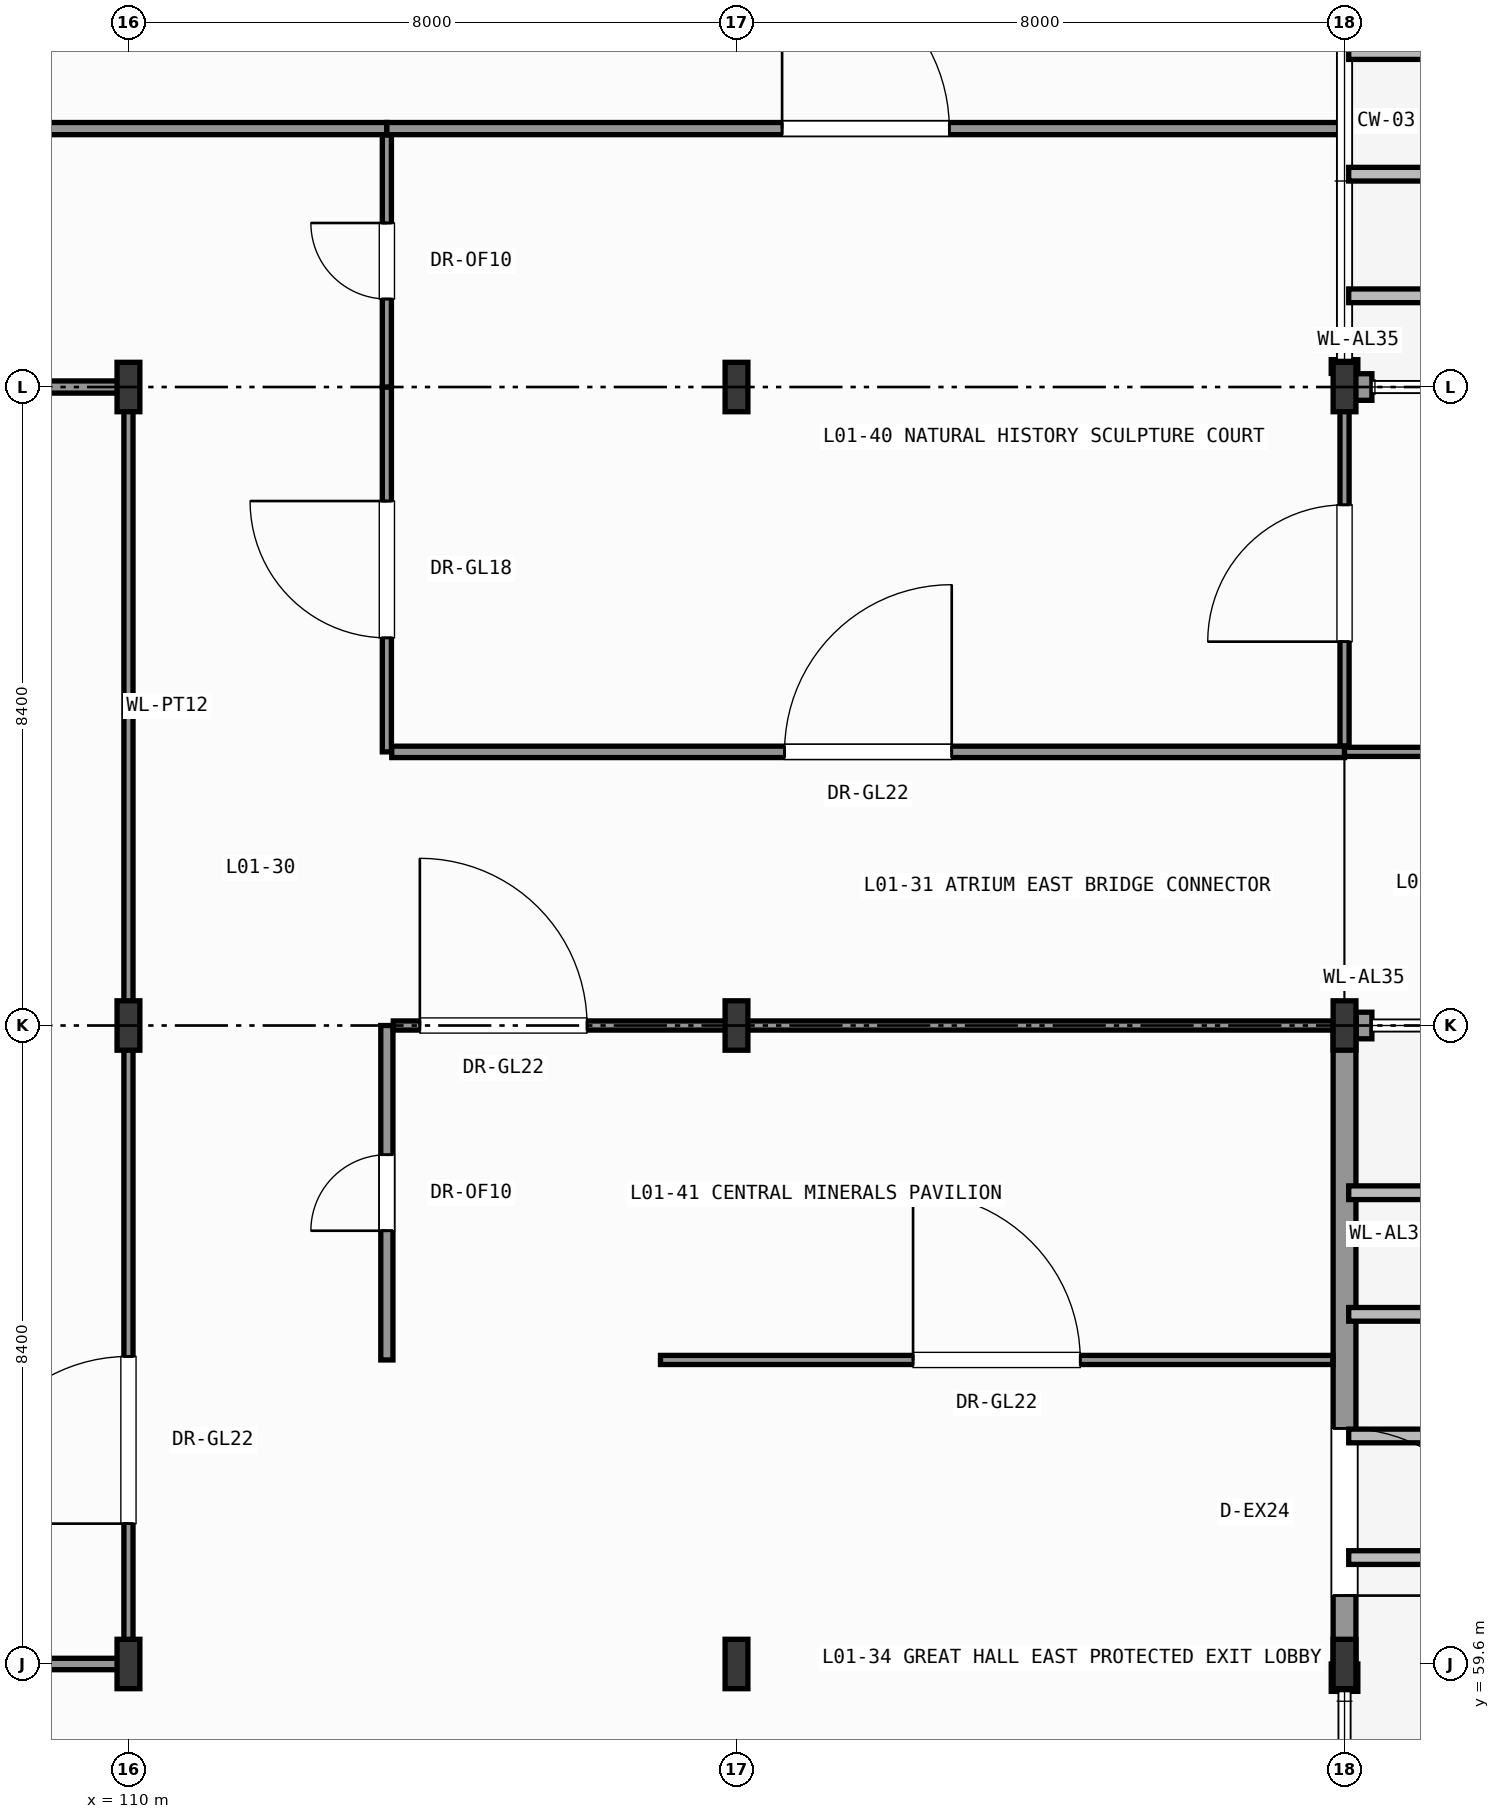
"""IFC4 building model, lengths in metres.
Left out: names, types, materials, properties, quantities, classifications, styles, units other than length and angle.
Written with IfcOpenShell. Run it as: python <this file> out.ifc"""

import sys

from ifc_helpers import new_model, si_unit, direction, frame, frame_2d, origin, origin_2d, place, context, subcontext, project, spatial, rectangle, i_section, extrude, element, fill, save


model = new_model("IFC4")
c1 = context("Model", 3, precision=1e-05, world=origin(), true_north=direction((0.0, 1.0)))
c2 = subcontext(c1, "Body", "Model", "MODEL_VIEW")
j1 = project(units=[si_unit("LENGTHUNIT", "METRE"), si_unit("PLANEANGLEUNIT", "RADIAN")], contexts=[c1])
p1 = place(None, origin())
s1 = spatial("IfcSite", under=j1, at=p1, CompositionType="ELEMENT")
p2 = place(p1, origin())
s2 = spatial("IfcBuilding", under=s1, at=p2, CompositionType="ELEMENT")
p3 = place(p2, origin())
s3 = spatial("IfcBuildingStorey", under=s2, at=p3, CompositionType="ELEMENT", Elevation=0.0)
for number, where, z_axis, x_axis in (
    (1, (110.0, 59.6, 0.0), (0.0, 0.0, 1.0), (1.0, 0.0, 0.0)),
    (2, (110.0, 68.0, 0.0), (0.0, 0.0, 1.0), (1.0, 0.0, 0.0)),
    (3, (110.0, 76.4, 0.0), (0.0, 0.0, 1.0), (1.0, 0.0, 0.0)),
    (4, (118.0, 59.6, 0.0), (0.0, 0.0, 1.0), (1.0, 0.0, 0.0)),
    (5, (118.0, 68.0, 0.0), (0.0, 0.0, 1.0), (1.0, 0.0, 0.0)),
    (6, (118.0, 76.4, 0.0), (0.0, 0.0, 1.0), (1.0, 0.0, 0.0)),
    (7, (126.0, 59.6, 0.0), (0.0, 0.0, 1.0), (1.0, 0.0, 0.0)),
    (8, (126.0, 68.0, 0.0), (0.0, 0.0, 1.0), (1.0, 0.0, 0.0)),
    (9, (126.0, 76.4, 0.0), (0.0, 0.0, 1.0), (1.0, 0.0, 0.0)),
):
    element("IfcColumn", number, at=place(p3, frame(where, z_axis=z_axis, x_axis=x_axis)), inside=s3, PredefinedType="COLUMN", context=c2, shape_type="SweptSolid", body=[
        extrude(i_section(OverallWidth=0.3, OverallDepth=0.65, WebThickness=0.016, FlangeThickness=0.031, FilletRadius=0.027, at=origin_2d()), origin(), (0.0, 0.0, 1.0), 7.8),
    ])
p4 = place(p3, frame((126.0, 59.24, 0.0), z_axis=(0.0, 0.0, 1.0), x_axis=(0.0, 1.0, 0.0)))
e10 = element("IfcWall", 10, at=p4, inside=s3, PredefinedType="SOLIDWALL", context=c2, shape_type="SweptSolid", body=[
    extrude(rectangle(XDim=0.36, YDim=0.35, at=frame_2d((0.18, 0.0))), origin(), (0.0, 0.0, 1.0), 7.235),
])
p5 = place(p3, frame((126.0, 68.0, 0.0), z_axis=(0.0, 0.0, 1.0), x_axis=(0.0, -1.0, 0.0)))
e11 = element("IfcWall", 11, at=p5, inside=s3, PredefinedType="SOLIDWALL", context=c2, shape_type="SweptSolid", body=[
    extrude(rectangle(XDim=8.4, YDim=0.3, at=frame_2d((4.2, 0.0))), origin(), (0.0, 0.0, 1.0), 7.085),
])
p6 = place(p5, frame((5.3, 0.0, 0.0)))
e12 = element("IfcOpeningElement", 12, at=p6, cuts=e11, PredefinedType="OPENING", context=c2, shape_type="SweptSolid", body=[
    extrude(rectangle(XDim=2.2, YDim=2.7, at=frame_2d((1.1, 1.35))), frame((0.0, 0.16, 0.0), z_axis=(0.0, -1.0, 0.0), x_axis=(1.0, 0.0, 0.0)), (0.0, 0.0, 1.0), 0.32),
])
p7 = place(p3, frame((126.154, 68.0, 0.0), z_axis=(0.0, 0.0, 1.0), x_axis=(1.0, 0.0, 0.0)))
e13 = element("IfcWall", 13, at=p7, inside=s3, PredefinedType="SOLIDWALL", context=c2, shape_type="SweptSolid", body=[
    extrude(rectangle(XDim=0.206, YDim=0.35, at=frame_2d((0.103, 0.0))), origin(), (0.0, 0.0, 1.0), 7.54),
])
p8 = place(p3, frame((126.36, 76.4, 0.0), z_axis=(0.0, 0.0, 1.0), x_axis=(-1.0, 0.0, 0.0)))
e14 = element("IfcWall", 14, at=p8, inside=s3, PredefinedType="SOLIDWALL", context=c2, shape_type="SweptSolid", body=[
    extrude(rectangle(XDim=0.36, YDim=0.35, at=frame_2d((0.18, 0.0))), origin(), (0.0, 0.0, 1.0), 7.135),
])
p9 = place(p3, frame((126.0, 76.579, 0.0), z_axis=(0.0, 0.0, 1.0), x_axis=(0.0, 1.0, 0.0)))
e15 = element("IfcWall", 15, at=p9, inside=s3, PredefinedType="SOLIDWALL", context=c2, shape_type="SweptSolid", body=[
    extrude(rectangle(XDim=0.181, YDim=0.35, at=frame_2d((0.09, 0.0))), origin(), (0.0, 0.0, 1.0), 7.54),
])
p10 = place(p3, frame((86.084, 59.6, 0.0), z_axis=(0.0, 0.0, 1.0), x_axis=(1.0, 0.0, 0.0)))
e16 = element("IfcWall", 16, at=p10, inside=s3, PredefinedType="PARTITIONING", context=c2, shape_type="SweptSolid", body=[
    extrude(rectangle(XDim=23.916, YDim=0.15, at=frame_2d((11.958, 0.0))), origin(), (0.0, 0.0, 1.0), 7.135),
])
p11 = place(p10, frame((10.858, 0.0, 0.0)))
e17 = element("IfcOpeningElement", 17, at=p11, cuts=e16, PredefinedType="OPENING", context=c2, shape_type="SweptSolid", body=[
    extrude(rectangle(XDim=2.2, YDim=2.6, at=frame_2d((1.1, 1.3))), frame((0.0, 0.085, 0.0), z_axis=(0.0, -1.0, 0.0), x_axis=(1.0, 0.0, 0.0)), (0.0, 0.0, 1.0), 0.17),
])
p12 = place(p3, frame((110.0, 59.679, 0.0), z_axis=(0.0, 0.0, 1.0), x_axis=(0.0, 1.0, 0.0)))
e18 = element("IfcWall", 18, at=p12, inside=s3, PredefinedType="PARTITIONING", context=c2, shape_type="SweptSolid", body=[
    extrude(rectangle(XDim=16.721, YDim=0.12, at=frame_2d((8.36, 0.0))), origin(), (0.0, 0.0, 1.0), 7.085),
])
p13 = place(p12, frame((1.768, 0.0, 0.0)))
e19 = element("IfcOpeningElement", 19, at=p13, cuts=e18, PredefinedType="OPENING", context=c2, shape_type="SweptSolid", body=[
    extrude(rectangle(XDim=2.2, YDim=2.6, at=frame_2d((1.1, 1.3))), frame((0.0, 0.07, 0.0), z_axis=(0.0, -1.0, 0.0), x_axis=(1.0, 0.0, 0.0)), (0.0, 0.0, 1.0), 0.14),
])
p14 = place(p3, frame((86.0, 76.4, 0.0), z_axis=(0.0, 0.0, 1.0), x_axis=(1.0, 0.0, 0.0)))
e20 = element("IfcWall", 20, at=p14, inside=s3, PredefinedType="PARTITIONING", context=c2, shape_type="SweptSolid", body=[
    extrude(rectangle(XDim=23.936, YDim=0.16, at=frame_2d((11.968, 0.0))), origin(), (0.0, 0.0, 1.0), 7.135),
])
p15 = place(p14, frame((10.868, 0.0, 0.0)))
e21 = element("IfcOpeningElement", 21, at=p15, cuts=e20, PredefinedType="OPENING", context=c2, shape_type="SweptSolid", body=[
    extrude(rectangle(XDim=2.2, YDim=2.6, at=frame_2d((1.1, 1.3))), frame((0.0, 0.09, 0.0), z_axis=(0.0, -1.0, 0.0), x_axis=(1.0, 0.0, 0.0)), (0.0, 0.0, 1.0), 0.18),
])
p16 = place(p3, frame((113.4, 71.6, 0.0), z_axis=(0.0, 0.0, 1.0), x_axis=(0.0, 1.0, 0.0)))
e22 = element("IfcWall", 22, at=p16, inside=s3, PredefinedType="PARTITIONING", context=c2, shape_type="SweptSolid", body=[
    extrude(rectangle(XDim=4.8, YDim=0.12, at=frame_2d((2.4, 0.0))), origin(), (0.0, 0.0, 1.0), 7.54),
])
p17 = place(p16, frame((1.5, 0.0, 0.0)))
e23 = element("IfcOpeningElement", 23, at=p17, cuts=e22, PredefinedType="OPENING", context=c2, shape_type="SweptSolid", body=[
    extrude(rectangle(XDim=1.8, YDim=2.4, at=frame_2d((0.9, 1.2))), frame((0.0, 0.07, 0.0), z_axis=(0.0, -1.0, 0.0), x_axis=(1.0, 0.0, 0.0)), (0.0, 0.0, 1.0), 0.14),
])
p18 = place(p3, frame((113.4, 63.6, 0.0), z_axis=(0.0, 0.0, 1.0), x_axis=(0.0, 1.0, 0.0)))
e24 = element("IfcWall", 24, at=p18, inside=s3, PredefinedType="PARTITIONING", context=c2, shape_type="SweptSolid", body=[
    extrude(rectangle(XDim=4.4, YDim=0.16, at=frame_2d((2.2, 0.0))), origin(), (0.0, 0.0, 1.0), 7.54),
])
p19 = place(p18, frame((1.7, 0.0, 0.0)))
e25 = element("IfcOpeningElement", 25, at=p19, cuts=e24, PredefinedType="OPENING", context=c2, shape_type="SweptSolid", body=[
    extrude(rectangle(XDim=1.0, YDim=2.15, at=frame_2d((0.5, 1.075))), frame((0.0, 0.09, 0.0), z_axis=(0.0, -1.0, 0.0), x_axis=(1.0, 0.0, 0.0)), (0.0, 0.0, 1.0), 0.18),
])
p20 = place(p3, frame((113.464, 71.6, 0.0), z_axis=(0.0, 0.0, 1.0), x_axis=(1.0, 0.0, 0.0)))
e26 = element("IfcWall", 26, at=p20, inside=s3, PredefinedType="PARTITIONING", context=c2, shape_type="SweptSolid", body=[
    extrude(rectangle(XDim=12.536, YDim=0.15, at=frame_2d((6.268, 0.0))), origin(), (0.0, 0.0, 1.0), 7.54),
])
p21 = place(p20, frame((5.168, 0.0, 0.0)))
e27 = element("IfcOpeningElement", 27, at=p21, cuts=e26, PredefinedType="OPENING", context=c2, shape_type="SweptSolid", body=[
    extrude(rectangle(XDim=2.2, YDim=2.6, at=frame_2d((1.1, 1.3))), frame((0.0, 0.085, 0.0), z_axis=(0.0, -1.0, 0.0), x_axis=(1.0, 0.0, 0.0)), (0.0, 0.0, 1.0), 0.17),
])
p22 = place(p3, frame((113.484, 68.0, 0.0), z_axis=(0.0, 0.0, 1.0), x_axis=(1.0, 0.0, 0.0)))
e28 = element("IfcWall", 28, at=p22, inside=s3, PredefinedType="PARTITIONING", context=c2, shape_type="SweptSolid", body=[
    extrude(rectangle(XDim=12.362, YDim=0.12, at=frame_2d((6.181, 0.0))), origin(), (0.0, 0.0, 1.0), 7.225),
])
p23 = place(p22, frame((0.35, 0.0, 0.0)))
e29 = element("IfcOpeningElement", 29, at=p23, cuts=e28, PredefinedType="OPENING", context=c2, shape_type="SweptSolid", body=[
    extrude(rectangle(XDim=2.2, YDim=2.6, at=frame_2d((1.1, 1.3))), frame((0.0, 0.07, 0.0), z_axis=(0.0, -1.0, 0.0), x_axis=(1.0, 0.0, 0.0)), (0.0, 0.0, 1.0), 0.14),
])
p24 = place(p3, frame((97.4, 79.8, 0.0), z_axis=(0.0, 0.0, 1.0), x_axis=(1.0, 0.0, 0.0)))
e30 = element("IfcWall", 30, at=p24, inside=s3, PredefinedType="PARTITIONING", context=c2, shape_type="SweptSolid", body=[
    extrude(rectangle(XDim=16.0, YDim=0.16, at=frame_2d((8.0, 0.0))), origin(), (0.0, 0.0, 1.0), 7.165),
])
p25 = place(p24, frame((6.9, 0.0, 0.0)))
e31 = element("IfcOpeningElement", 31, at=p25, cuts=e30, PredefinedType="OPENING", context=c2, shape_type="SweptSolid", body=[
    extrude(rectangle(XDim=2.2, YDim=2.6, at=frame_2d((1.1, 1.3))), frame((0.0, 0.09, 0.0), z_axis=(0.0, -1.0, 0.0), x_axis=(1.0, 0.0, 0.0)), (0.0, 0.0, 1.0), 0.18),
])
p26 = place(p3, frame((113.4, 76.4, 0.0), z_axis=(0.0, 0.0, 1.0), x_axis=(0.0, 1.0, 0.0)))
e32 = element("IfcWall", 32, at=p26, inside=s3, PredefinedType="PARTITIONING", context=c2, shape_type="SweptSolid", body=[
    extrude(rectangle(XDim=3.316, YDim=0.12, at=frame_2d((1.658, 0.0))), origin(), (0.0, 0.0, 1.0), 7.54),
])
p27 = place(p26, frame((1.158, 0.0, 0.0)))
e33 = element("IfcOpeningElement", 33, at=p27, cuts=e32, PredefinedType="OPENING", context=c2, shape_type="SweptSolid", body=[
    extrude(rectangle(XDim=1.0, YDim=2.15, at=frame_2d((0.5, 1.075))), frame((0.0, 0.07, 0.0), z_axis=(0.0, -1.0, 0.0), x_axis=(1.0, 0.0, 0.0)), (0.0, 0.0, 1.0), 0.14),
])
p28 = place(p3, frame((117.0, 63.6, 0.0), z_axis=(0.0, 0.0, 1.0), x_axis=(1.0, 0.0, 0.0)))
e34 = element("IfcWall", 34, at=p28, inside=s3, PredefinedType="PARTITIONING", context=c2, shape_type="SweptSolid", body=[
    extrude(rectangle(XDim=8.846, YDim=0.12, at=frame_2d((4.423, 0.0))), origin(), (0.0, 0.0, 1.0), 7.54),
])
p29 = place(p28, frame((3.323, 0.0, 0.0)))
e35 = element("IfcOpeningElement", 35, at=p29, cuts=e34, PredefinedType="OPENING", context=c2, shape_type="SweptSolid", body=[
    extrude(rectangle(XDim=2.2, YDim=2.6, at=frame_2d((1.1, 1.3))), frame((0.0, 0.07, 0.0), z_axis=(0.0, -1.0, 0.0), x_axis=(1.0, 0.0, 0.0)), (0.0, 0.0, 1.0), 0.14),
])
p30 = place(p3, frame((113.4, 79.8, 0.0), z_axis=(0.0, 0.0, 1.0), x_axis=(1.0, 0.0, 0.0)))
e36 = element("IfcWall", 36, at=p30, inside=s3, PredefinedType="PARTITIONING", context=c2, shape_type="SweptSolid", body=[
    extrude(rectangle(XDim=12.6, YDim=0.16, at=frame_2d((6.3, 0.0))), origin(), (0.0, 0.0, 1.0), 7.165),
])
p31 = place(p30, frame((5.2, 0.0, 0.0)))
e37 = element("IfcOpeningElement", 37, at=p31, cuts=e36, PredefinedType="OPENING", context=c2, shape_type="SweptSolid", body=[
    extrude(rectangle(XDim=2.2, YDim=2.6, at=frame_2d((1.1, 1.3))), frame((0.0, 0.09, 0.0), z_axis=(0.0, -1.0, 0.0), x_axis=(1.0, 0.0, 0.0)), (0.0, 0.0, 1.0), 0.18),
])
p32 = place(p3, frame((126.0, 71.679, 0.0), z_axis=(0.0, 0.0, 1.0), x_axis=(0.0, 1.0, 0.0)))
e38 = element("IfcWall", 38, at=p32, inside=s3, PredefinedType="PARTITIONING", context=c2, shape_type="SweptSolid", body=[
    extrude(rectangle(XDim=4.542, YDim=0.12, at=frame_2d((2.271, 0.0))), origin(), (0.0, 0.0, 1.0), 7.085),
])
p33 = place(p32, frame((1.371, 0.0, 0.0)))
e39 = element("IfcOpeningElement", 39, at=p33, cuts=e38, PredefinedType="OPENING", context=c2, shape_type="SweptSolid", body=[
    extrude(rectangle(XDim=1.8, YDim=2.4, at=frame_2d((0.9, 1.2))), frame((0.0, 0.07, 0.0), z_axis=(0.0, -1.0, 0.0), x_axis=(1.0, 0.0, 0.0)), (0.0, 0.0, 1.0), 0.14),
])
p34 = place(p3, frame((126.0, 71.6, 0.0), z_axis=(0.0, 0.0, 1.0), x_axis=(1.0, 0.0, 0.0)))
e40 = element("IfcWall", 40, at=p34, inside=s3, PredefinedType="PARTITIONING", context=c2, shape_type="SweptSolid", body=[
    extrude(rectangle(XDim=41.0, YDim=0.12, at=frame_2d((20.5, 0.0))), origin(), (0.0, 0.0, 1.0), 7.54),
])
p35 = place(p34, frame((19.4, 0.0, 0.0)))
e41 = element("IfcOpeningElement", 41, at=p35, cuts=e40, PredefinedType="OPENING", context=c2, shape_type="SweptSolid", body=[
    extrude(rectangle(XDim=2.2, YDim=2.6, at=frame_2d((1.1, 1.3))), frame((0.0, 0.07, 0.0), z_axis=(0.0, -1.0, 0.0), x_axis=(1.0, 0.0, 0.0)), (0.0, 0.0, 1.0), 0.14),
])
p36 = place(p6, origin())
e42 = element("IfcDoor", 42, at=p36, inside=s3, OperationType="SINGLE_SWING_RIGHT", PredefinedType="DOOR", context=c2, shape_type="SweptSolid", body=[
    extrude(rectangle(XDim=2.2, YDim=2.7, at=frame_2d((1.1, 1.35))), frame((0.0, 0.025, 0.0), z_axis=(0.0, -1.0, 0.0), x_axis=(1.0, 0.0, 0.0)), (0.0, 0.0, 1.0), 0.05),
])
fill(e12, e42)
p37 = place(p13, origin())
e43 = element("IfcDoor", 43, at=p37, inside=s3, OperationType="SINGLE_SWING_LEFT", PredefinedType="DOOR", context=c2, shape_type="SweptSolid", body=[
    extrude(rectangle(XDim=2.2, YDim=2.6, at=frame_2d((1.1, 1.3))), frame((0.0, 0.025, 0.0), z_axis=(0.0, -1.0, 0.0), x_axis=(1.0, 0.0, 0.0)), (0.0, 0.0, 1.0), 0.05),
])
fill(e19, e43)
p38 = place(p17, origin())
e44 = element("IfcDoor", 44, at=p38, inside=s3, OperationType="SINGLE_SWING_RIGHT", PredefinedType="DOOR", context=c2, shape_type="SweptSolid", body=[
    extrude(rectangle(XDim=1.8, YDim=2.4, at=frame_2d((0.9, 1.2))), frame((0.0, 0.025, 0.0), z_axis=(0.0, -1.0, 0.0), x_axis=(1.0, 0.0, 0.0)), (0.0, 0.0, 1.0), 0.05),
])
fill(e23, e44)
p39 = place(p19, origin())
e45 = element("IfcDoor", 45, at=p39, inside=s3, OperationType="SINGLE_SWING_LEFT", PredefinedType="DOOR", context=c2, shape_type="SweptSolid", body=[
    extrude(rectangle(XDim=1.0, YDim=2.15, at=frame_2d((0.5, 1.075))), frame((0.0, 0.025, 0.0), z_axis=(0.0, -1.0, 0.0), x_axis=(1.0, 0.0, 0.0)), (0.0, 0.0, 1.0), 0.05),
])
fill(e25, e45)
p40 = place(p21, origin())
e46 = element("IfcDoor", 46, at=p40, inside=s3, OperationType="SINGLE_SWING_RIGHT", PredefinedType="DOOR", context=c2, shape_type="SweptSolid", body=[
    extrude(rectangle(XDim=2.2, YDim=2.6, at=frame_2d((1.1, 1.3))), frame((0.0, 0.025, 0.0), z_axis=(0.0, -1.0, 0.0), x_axis=(1.0, 0.0, 0.0)), (0.0, 0.0, 1.0), 0.05),
])
fill(e27, e46)
p41 = place(p23, origin())
e47 = element("IfcDoor", 47, at=p41, inside=s3, OperationType="SINGLE_SWING_LEFT", PredefinedType="DOOR", context=c2, shape_type="SweptSolid", body=[
    extrude(rectangle(XDim=2.2, YDim=2.6, at=frame_2d((1.1, 1.3))), frame((0.0, 0.025, 0.0), z_axis=(0.0, -1.0, 0.0), x_axis=(1.0, 0.0, 0.0)), (0.0, 0.0, 1.0), 0.05),
])
fill(e29, e47)
p42 = place(p27, origin())
e48 = element("IfcDoor", 48, at=p42, inside=s3, OperationType="SINGLE_SWING_RIGHT", PredefinedType="DOOR", context=c2, shape_type="SweptSolid", body=[
    extrude(rectangle(XDim=1.0, YDim=2.15, at=frame_2d((0.5, 1.075))), frame((0.0, 0.025, 0.0), z_axis=(0.0, -1.0, 0.0), x_axis=(1.0, 0.0, 0.0)), (0.0, 0.0, 1.0), 0.05),
])
fill(e33, e48)
p43 = place(p29, origin())
e49 = element("IfcDoor", 49, at=p43, inside=s3, OperationType="SINGLE_SWING_LEFT", PredefinedType="DOOR", context=c2, shape_type="SweptSolid", body=[
    extrude(rectangle(XDim=2.2, YDim=2.6, at=frame_2d((1.1, 1.3))), frame((0.0, 0.025, 0.0), z_axis=(0.0, -1.0, 0.0), x_axis=(1.0, 0.0, 0.0)), (0.0, 0.0, 1.0), 0.05),
])
fill(e35, e49)
p44 = place(p31, origin())
e50 = element("IfcDoor", 50, at=p44, inside=s3, OperationType="SINGLE_SWING_LEFT", PredefinedType="DOOR", context=c2, shape_type="SweptSolid", body=[
    extrude(rectangle(XDim=2.2, YDim=2.6, at=frame_2d((1.1, 1.3))), frame((0.0, 0.025, 0.0), z_axis=(0.0, -1.0, 0.0), x_axis=(1.0, 0.0, 0.0)), (0.0, 0.0, 1.0), 0.05),
])
fill(e37, e50)
p45 = place(p33, origin())
e51 = element("IfcDoor", 51, at=p45, inside=s3, OperationType="SINGLE_SWING_LEFT", PredefinedType="DOOR", context=c2, shape_type="SweptSolid", body=[
    extrude(rectangle(XDim=1.8, YDim=2.4, at=frame_2d((0.9, 1.2))), frame((0.0, 0.025, 0.0), z_axis=(0.0, -1.0, 0.0), x_axis=(1.0, 0.0, 0.0)), (0.0, 0.0, 1.0), 0.05),
])
fill(e39, e51)
save(model, sys.argv[1])
